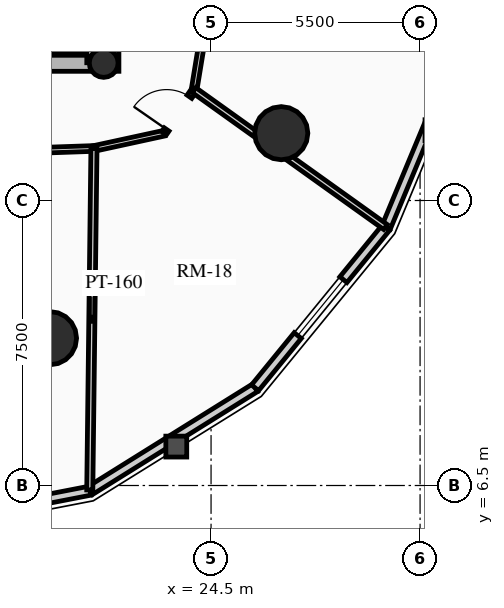
"""IFC4 building model, lengths in metres.
Left out: names, types, materials, properties, quantities, classifications, styles, units other than length and angle.
Written with IfcOpenShell. Run it as: python <this file> out.ifc"""

import sys

from ifc_helpers import new_model, si_unit, direction, frame, frame_2d, origin, origin_2d, place, context, subcontext, project, spatial, rectangle, circle, hollow_circle, extrude, source, transform, mapped, element, fill, save


model = new_model("IFC4")
c1 = context("Model", 3, precision=1e-05, world=origin(), true_north=direction((0.0, 1.0)))
c2 = subcontext(c1, "Body", "Model", "MODEL_VIEW")
j1 = project(units=[si_unit("LENGTHUNIT", "METRE"), si_unit("PLANEANGLEUNIT", "RADIAN")], contexts=[c1])
p1 = place(None, origin())
s1 = spatial("IfcSite", under=j1, at=p1, CompositionType="ELEMENT")
p2 = place(p1, origin())
s2 = spatial("IfcBuilding", under=s1, at=p2, CompositionType="ELEMENT")
p3 = place(p2, frame((0.0, 0.0, 78.88)))
s3 = spatial("IfcBuildingStorey", under=s2, at=p3, CompositionType="ELEMENT", Elevation=78.88)
p4 = place(p3, frame((21.85, 17.4, 0.0), z_axis=(0.0, 0.0, 1.0), x_axis=(0.0, 1.0, 0.0)))
e1 = element("IfcWall", 1, at=p4, inside=s3, PredefinedType="SHEAR", context=c2, shape_type="SweptSolid", body=[
    extrude(rectangle(XDim=14.2, YDim=0.45, at=frame_2d((7.1, 0.0))), origin(), (0.0, 0.0, 1.0), 2.91),
])
p5 = place(p3, frame((11.15, 17.625, 0.0), z_axis=(0.0, 0.0, 1.0), x_axis=(1.0, 0.0, 0.0)))
e2 = element("IfcWall", 2, at=p5, inside=s3, PredefinedType="SHEAR", context=c2, shape_type="SweptSolid", body=[
    extrude(rectangle(XDim=10.7, YDim=0.45, at=frame_2d((5.35, 0.0))), origin(), (0.0, 0.0, 1.0), 2.91),
])
m1 = source(origin(), c2, "Body", "SweptSolid", [
    extrude(rectangle(XDim=1.5, YDim=2.02, at=frame_2d((0.75, 1.01))), frame((0.0, 0.235, 0.0), z_axis=(0.0, -1.0, 0.0), x_axis=(1.0, 0.0, 0.0)), (0.0, 0.0, 1.0), 0.47),
])
p6 = place(p5, frame((5.45, 0.0, 0.0)))
e3 = element("IfcOpeningElement", 3, at=p6, cuts=e2, PredefinedType="OPENING", context=c2, shape_type="MappedRepresentation", body=[
    mapped(m1, transform((0.0, 0.0, 0.0), x_axis=(1.0, 0.0, 0.0), y_axis=(0.0, 1.0, 0.0), z_axis=(0.0, 0.0, 1.0), scale=1.0)),
])
p7 = place(p3, frame((21.405, 17.625, 0.0), z_axis=(0.0, 0.0, 1.0), x_axis=(0.0, 1.0, 0.0)))
e4 = element("IfcWall", 4, at=p7, inside=s3, PredefinedType="SHEAR", context=c2, shape_type="SweptSolid", body=[
    extrude(rectangle(XDim=6.72, YDim=0.35, at=frame_2d((3.36, 0.0))), origin(), (0.0, 0.0, 1.0), 2.91),
])
p8 = place(p3, frame((21.675, 17.62, 0.0), z_axis=(0.0, 0.0, 1.0), x_axis=(1.0, 0.0, 0.0)))
e5 = element("IfcColumn", 5, at=p8, inside=s3, PredefinedType="COLUMN", context=c2, shape_type="SweptSolid", body=[
    extrude(hollow_circle(Radius=0.38, WallThickness=0.032, at=origin_2d()), origin(), (0.0, 0.0, 1.0), 2.91),
])
for number, where, z_axis, x_axis in (
    (6, (20.261, 10.377, 0.0), (0.0, 0.0, 1.0), (1.0, 0.0, 0.0)),
    (7, (26.347, 15.771, 0.0), (0.0, 0.0, 1.0), (1.0, 0.0, 0.0)),
):
    element("IfcColumn", number, at=place(p3, frame(where, z_axis=z_axis, x_axis=x_axis)), inside=s3, PredefinedType="USERDEFINED", context=c2, shape_type="SweptSolid", body=[
        extrude(circle(Radius=0.7, at=origin_2d()), origin(), (0.0, 0.0, 1.0), 2.91),
    ])
p9 = place(p3, frame((21.315, 6.363, 0.0), z_axis=(0.0, 0.0, 1.0), x_axis=(-0.981723785992, -0.190311344954, 0.0)))
e8 = element("IfcWall", 8, at=p9, inside=s3, PredefinedType="SOLIDWALL", context=c2, shape_type="SweptSolid", body=[
    extrude(rectangle(XDim=4.904, YDim=0.24, at=frame_2d((2.452, 0.0))), origin(), (0.0, 0.0, 1.0), 2.179),
])
m2 = source(origin(), c2, "Body", "SweptSolid", [
    extrude(rectangle(XDim=2.2, YDim=1.35, at=frame_2d((1.1, 0.675))), frame((0.0, 0.13, 0.0), z_axis=(0.0, -1.0, 0.0), x_axis=(1.0, 0.0, 0.0)), (0.0, 0.0, 1.0), 0.26),
])
p10 = place(p9, frame((1.352, 0.0, 0.65)))
e9 = element("IfcOpeningElement", 9, at=p10, cuts=e8, PredefinedType="OPENING", context=c2, shape_type="MappedRepresentation", body=[
    mapped(m2, transform((0.0, 0.0, 0.0), x_axis=(1.0, 0.0, 0.0), y_axis=(0.0, 1.0, 0.0), z_axis=(0.0, 0.0, 1.0), scale=1.0)),
])
p11 = place(p3, frame((25.658, 9.072, 0.0), z_axis=(0.0, 0.0, 1.0), x_axis=(-0.848520380187, -0.529162701263, 0.0)))
e10 = element("IfcWall", 10, at=p11, inside=s3, PredefinedType="SOLIDWALL", context=c2, shape_type="SweptSolid", body=[
    extrude(rectangle(XDim=5.119, YDim=0.24, at=frame_2d((2.56, 0.0))), origin(), (0.0, 0.0, 1.0), 2.179),
])
p12 = place(p3, frame((29.105, 13.291, 0.0), z_axis=(0.0, 0.0, 1.0), x_axis=(-0.632700781152, -0.77439635945, 0.0)))
e11 = element("IfcWall", 11, at=p12, inside=s3, PredefinedType="SOLIDWALL", context=c2, shape_type="SweptSolid", body=[
    extrude(rectangle(XDim=5.448, YDim=0.24, at=frame_2d((2.724, 0.0))), origin(), (0.0, 0.0, 1.0), 2.179),
])
m3 = source(origin(), c2, "Body", "SweptSolid", [
    extrude(rectangle(XDim=1.9, YDim=1.35, at=frame_2d((0.95, 0.675))), frame((0.0, 0.13, 0.0), z_axis=(0.0, -1.0, 0.0), x_axis=(1.0, 0.0, 0.0)), (0.0, 0.0, 1.0), 0.26),
])
p13 = place(p12, frame((1.774, 0.0, 0.65)))
e12 = element("IfcOpeningElement", 12, at=p13, cuts=e11, PredefinedType="OPENING", context=c2, shape_type="MappedRepresentation", body=[
    mapped(m3, transform((0.0, 0.0, 0.0), x_axis=(1.0, 0.0, 0.0), y_axis=(0.0, 1.0, 0.0), z_axis=(0.0, 0.0, 1.0), scale=1.0)),
])
p14 = place(p3, frame((31.318, 18.607, 0.0), z_axis=(0.0, 0.0, 1.0), x_axis=(-0.384344417632, -0.923189779317, 0.0)))
e13 = element("IfcWall", 13, at=p14, inside=s3, PredefinedType="SOLIDWALL", context=c2, shape_type="SweptSolid", body=[
    extrude(rectangle(XDim=5.758, YDim=0.24, at=frame_2d((2.879, 0.0))), origin(), (0.0, 0.0, 1.0), 2.179),
])
p15 = place(p3, frame((14.781, 15.141, 0.0), z_axis=(0.0, 0.0, 1.0), x_axis=(0.999407918707, 0.034406569513, 0.0)))
e14 = element("IfcWall", 14, at=p15, inside=s3, PredefinedType="PARTITIONING", context=c2, shape_type="SweptSolid", body=[
    extrude(rectangle(XDim=6.642, YDim=0.15, at=frame_2d((3.321, 0.0))), origin(), (0.0, 0.0, 1.0), 2.225),
])
m4 = source(origin(), c2, "Body", "SweptSolid", [
    extrude(rectangle(XDim=1.05, YDim=2.015, at=frame_2d((0.525, 1.007))), frame((0.0, 0.085, 0.0), z_axis=(0.0, -1.0, 0.0), x_axis=(1.0, 0.0, 0.0)), (0.0, 0.0, 1.0), 0.17),
])
p16 = place(p15, frame((2.796, 0.0, 0.0)))
e15 = element("IfcOpeningElement", 15, at=p16, cuts=e14, PredefinedType="OPENING", context=c2, shape_type="MappedRepresentation", body=[
    mapped(m4, transform((0.0, 0.0, 0.0), x_axis=(1.0, 0.0, 0.0), y_axis=(0.0, 1.0, 0.0), z_axis=(0.0, 0.0, 1.0), scale=1.0)),
])
p17 = place(p3, frame((21.419, 15.369, 0.0), z_axis=(0.0, 0.0, 1.0), x_axis=(0.977192701953, 0.212354475464, 0.0)))
e16 = element("IfcWall", 16, at=p17, inside=s3, PredefinedType="PARTITIONING", context=c2, shape_type="SweptSolid", body=[
    extrude(rectangle(XDim=1.888, YDim=0.15, at=frame_2d((0.944, 0.0))), origin(), (0.0, 0.0, 1.0), 2.225),
])
p18 = place(p3, frame((23.263, 15.77, 0.0), z_axis=(0.0, 0.0, 1.0), x_axis=(0.570743456919, 0.821128434768, 0.0)))
e17 = element("IfcWall", 17, at=p18, inside=s3, PredefinedType="PARTITIONING", context=c2, shape_type="SweptSolid", body=[
    extrude(rectangle(XDim=1.382, YDim=0.15, at=frame_2d((0.691, 0.0))), origin(), (0.0, 0.0, 1.0), 2.225),
])
p19 = place(p18, frame((0.12, 0.0, 0.0)))
e18 = element("IfcOpeningElement", 18, at=p19, cuts=e17, PredefinedType="OPENING", context=c2, shape_type="MappedRepresentation", body=[
    mapped(m4, transform((0.0, 0.0, 0.0), x_axis=(1.0, 0.0, 0.0), y_axis=(0.0, 1.0, 0.0), z_axis=(0.0, 0.0, 1.0), scale=1.0)),
])
p20 = place(p3, frame((24.052, 16.905, 0.0), z_axis=(0.0, 0.0, 1.0), x_axis=(0.162091534225, 0.986775726562, 0.0)))
e19 = element("IfcWall", 19, at=p20, inside=s3, PredefinedType="PARTITIONING", context=c2, shape_type="SweptSolid", body=[
    extrude(rectangle(XDim=1.613, YDim=0.15, at=frame_2d((0.807, 0.0))), origin(), (0.0, 0.0, 1.0), 2.225),
])
p21 = place(p3, frame((21.419, 15.369, 0.0), z_axis=(0.0, 0.0, 1.0), x_axis=(-0.012251185903, -0.999924951406, 0.0)))
e20 = element("IfcWall", 20, at=p21, inside=s3, PredefinedType="PARTITIONING", context=c2, shape_type="SweptSolid", body=[
    extrude(rectangle(XDim=8.988, YDim=0.16, at=frame_2d((4.494, 0.0))), origin(), (0.0, 0.0, 1.0), 2.179),
])
p22 = place(p3, frame((24.052, 16.905, 0.0), z_axis=(0.0, 0.0, 1.0), x_axis=(0.813437670746, -0.581652091727, 0.0)))
e21 = element("IfcWall", 21, at=p22, inside=s3, PredefinedType="PARTITIONING", context=c2, shape_type="SweptSolid", body=[
    extrude(rectangle(XDim=6.192, YDim=0.16, at=frame_2d((3.096, 0.0))), origin(), (0.0, 0.0, 1.0), 2.179),
])
m5 = source(origin(), c2, "Body", "SweptSolid", [
    extrude(rectangle(XDim=1.9, YDim=1.35, at=frame_2d((0.95, 0.675))), frame((0.0, 0.03, 0.0), z_axis=(0.0, -1.0, 0.0), x_axis=(1.0, 0.0, 0.0)), (0.0, 0.0, 1.0), 0.06),
])
p23 = place(p13, origin())
e22 = element("IfcWindow", 22, at=p23, inside=s3, PartitioningType="DOUBLE_PANEL_VERTICAL", PredefinedType="WINDOW", context=c2, shape_type="MappedRepresentation", body=[
    mapped(m5, transform((0.0, 0.0, 0.0), x_axis=(1.0, 0.0, 0.0), y_axis=(0.0, 1.0, 0.0), z_axis=(0.0, 0.0, 1.0), scale=1.0)),
])
fill(e12, e22)
m6 = source(origin(), c2, "Body", "SweptSolid", [
    extrude(rectangle(XDim=1.05, YDim=2.015, at=frame_2d((0.525, 1.007))), frame((0.0, 0.025, 0.0), z_axis=(0.0, -1.0, 0.0), x_axis=(1.0, 0.0, 0.0)), (0.0, 0.0, 1.0), 0.05),
])
p24 = place(p19, origin())
e23 = element("IfcDoor", 23, at=p24, inside=s3, OperationType="SINGLE_SWING_LEFT", PredefinedType="DOOR", context=c2, shape_type="MappedRepresentation", body=[
    mapped(m6, transform((0.0, 0.0, 0.0), x_axis=(1.0, 0.0, 0.0), y_axis=(0.0, 1.0, 0.0), z_axis=(0.0, 0.0, 1.0), scale=1.0)),
])
fill(e18, e23)
save(model, sys.argv[1])
